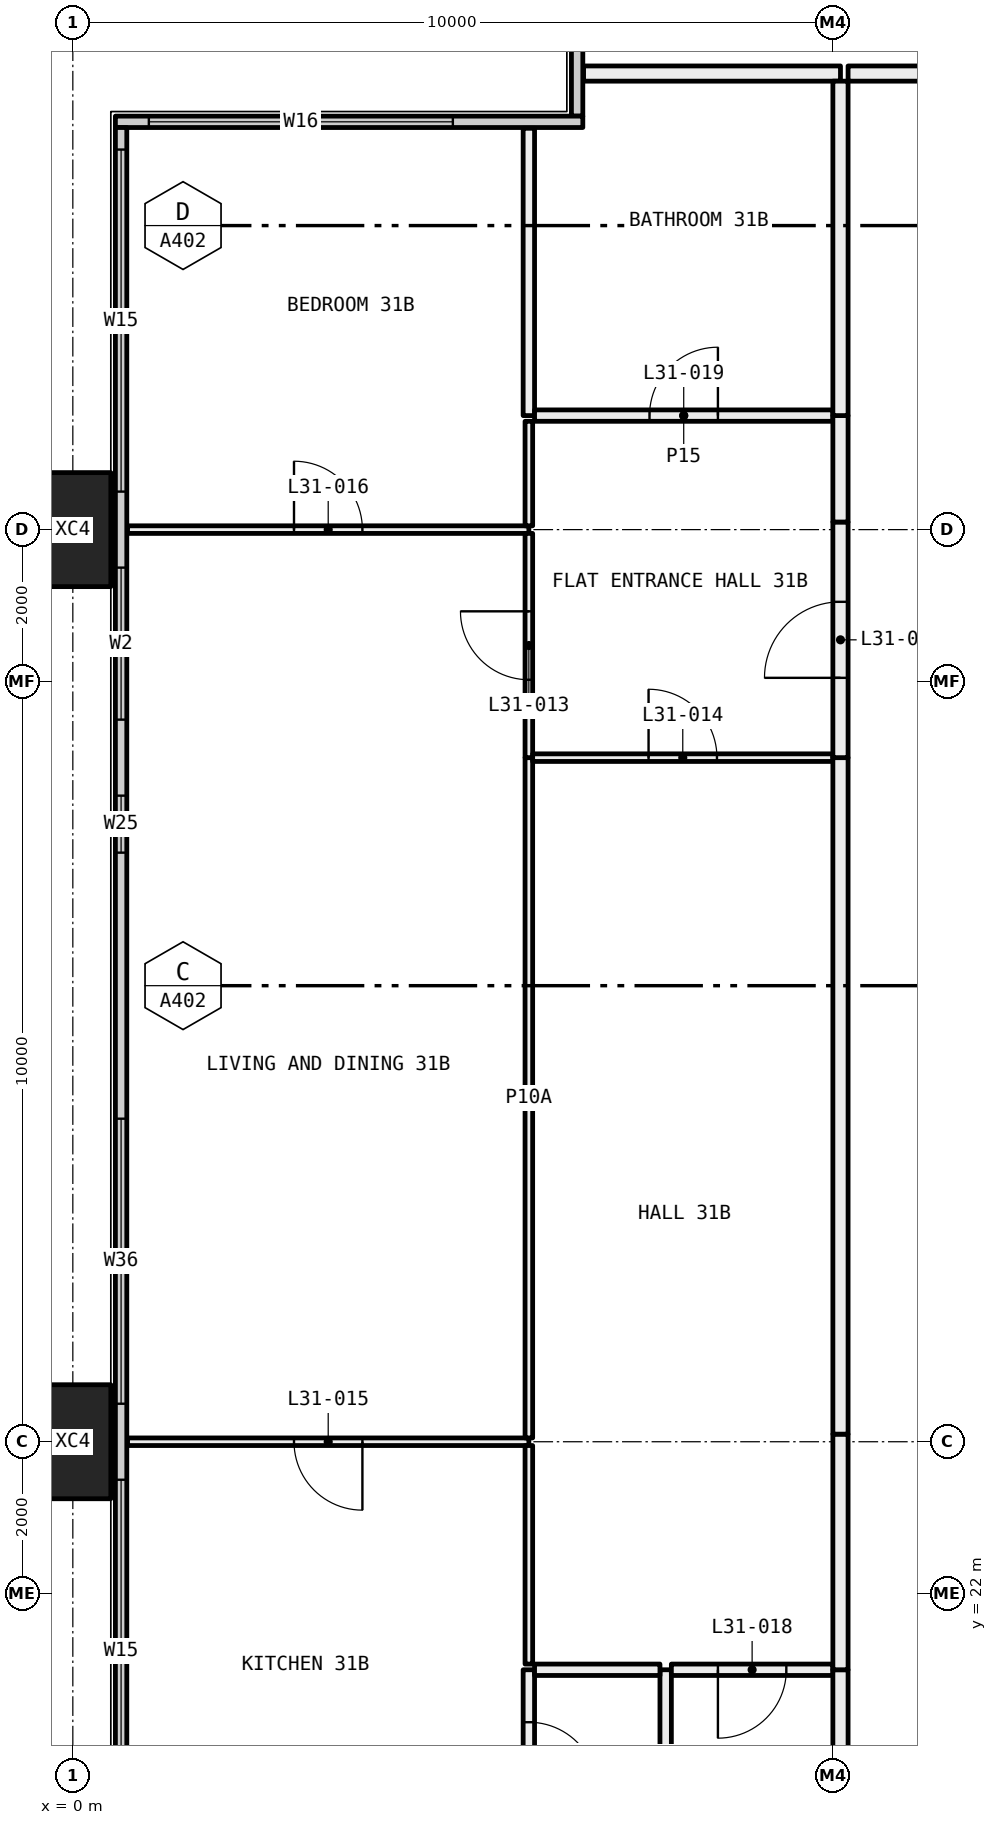
"""IFC4 building model, lengths in metres.
Left out: names, types, materials, properties, quantities, classifications, styles, units other than length and angle.
Written with IfcOpenShell. Run it as: python <this file> out.ifc"""

import sys

from ifc_helpers import new_model, si_unit, direction, frame, frame_2d, origin, origin_2d, place, context, subcontext, project, spatial, rectangle, hollow_rectangle, extrude, element, fill, save


model = new_model("IFC4")
c1 = context("Model", 3, precision=1e-05, world=origin(), true_north=direction((0.0, 1.0)))
c2 = subcontext(c1, "Body", "Model", "MODEL_VIEW")
j1 = project(units=[si_unit("LENGTHUNIT", "METRE"), si_unit("PLANEANGLEUNIT", "RADIAN")], contexts=[c1])
p1 = place(None, origin())
s1 = spatial("IfcSite", under=j1, at=p1, CompositionType="ELEMENT")
p2 = place(p1, origin())
s2 = spatial("IfcBuilding", under=s1, at=p2, CompositionType="ELEMENT")
p3 = place(p2, frame((0.0, 0.0, 120.75)))
s3 = spatial("IfcBuildingStorey", under=s2, at=p3, CompositionType="ELEMENT", Elevation=120.75)
for number, where, z_axis, x_axis in (
    (1, (0.0, 24.0, -0.4), (0.0, 0.0, 1.0), (0.0, 1.0, 0.0)),
    (2, (0.0, 36.0, -0.4), (0.0, 0.0, 1.0), (0.0, 1.0, 0.0)),
):
    element("IfcColumn", number, at=place(p3, frame(where, z_axis=z_axis, x_axis=x_axis)), inside=s3, PredefinedType="COLUMN", context=c2, shape_type="SweptSolid", body=[
        extrude(hollow_rectangle(XDim=1.5, YDim=1.0, WallThickness=0.06, at=origin_2d()), origin(), (0.0, 0.0, 1.0), 3.45),
    ])
p4 = place(p3, frame((6.635, 41.44, 0.0), z_axis=(0.0, 0.0, 1.0), x_axis=(0.0, 1.0, 0.0)))
e3 = element("IfcWall", 3, at=p4, inside=s3, PredefinedType="ELEMENTEDWALL", context=c2, shape_type="SweptSolid", body=[
    extrude(rectangle(XDim=5.85, YDim=0.15, at=frame_2d((2.925, 0.0))), origin(), (0.0, 0.0, 1.0), 3.05),
])
p5 = place(p4, frame((1.56, 0.0, 0.45)))
e4 = element("IfcOpeningElement", 4, at=p5, cuts=e3, PredefinedType="OPENING", context=c2, shape_type="SweptSolid", body=[
    extrude(rectangle(XDim=4.0, YDim=2.55, at=frame_2d((2.0, 1.275))), frame((0.0, 0.085, 0.0), z_axis=(0.0, -1.0, 0.0), x_axis=(1.0, 0.0, 0.0)), (0.0, 0.0, 1.0), 0.17),
])
p6 = place(p3, frame((0.56, 41.365, 0.0), z_axis=(0.0, 0.0, 1.0), x_axis=(1.0, 0.0, 0.0)))
e5 = element("IfcWall", 5, at=p6, inside=s3, PredefinedType="ELEMENTEDWALL", context=c2, shape_type="SweptSolid", body=[
    extrude(rectangle(XDim=6.15, YDim=0.15, at=frame_2d((3.075, 0.0))), origin(), (0.0, 0.0, 1.0), 3.05),
])
p7 = place(p6, frame((0.44, 0.0, 0.45)))
e6 = element("IfcOpeningElement", 6, at=p7, cuts=e5, PredefinedType="OPENING", context=c2, shape_type="SweptSolid", body=[
    extrude(rectangle(XDim=4.0, YDim=2.55, at=frame_2d((2.0, 1.275))), frame((0.0, 0.085, 0.0), z_axis=(0.0, -1.0, 0.0), x_axis=(1.0, 0.0, 0.0)), (0.0, 0.0, 1.0), 0.17),
])
p8 = place(p3, frame((0.635, 18.71, 0.0), z_axis=(0.0, 0.0, 1.0), x_axis=(0.0, 1.0, 0.0)))
e7 = element("IfcWall", 7, at=p8, inside=s3, PredefinedType="ELEMENTEDWALL", context=c2, shape_type="SweptSolid", body=[
    extrude(rectangle(XDim=22.58, YDim=0.15, at=frame_2d((11.29, 0.0))), origin(), (0.0, 0.0, 1.0), 3.05),
])
p9 = place(p8, frame((0.29, 0.0, 0.45)))
e8 = element("IfcOpeningElement", 8, at=p9, cuts=e7, PredefinedType="OPENING", context=c2, shape_type="SweptSolid", body=[
    extrude(rectangle(XDim=4.5, YDim=2.55, at=frame_2d((2.25, 1.275))), frame((0.0, 0.085, 0.0), z_axis=(0.0, -1.0, 0.0), x_axis=(1.0, 0.0, 0.0)), (0.0, 0.0, 1.0), 0.17),
])
p10 = place(p8, frame((5.79, 0.0, 0.45)))
e9 = element("IfcOpeningElement", 9, at=p10, cuts=e7, PredefinedType="OPENING", context=c2, shape_type="SweptSolid", body=[
    extrude(rectangle(XDim=3.75, YDim=2.55, at=frame_2d((1.875, 1.275))), frame((0.0, 0.085, 0.0), z_axis=(0.0, -1.0, 0.0), x_axis=(1.0, 0.0, 0.0)), (0.0, 0.0, 1.0), 0.17),
])
p11 = place(p8, frame((13.04, 0.0, 0.45)))
e10 = element("IfcOpeningElement", 10, at=p11, cuts=e7, PredefinedType="OPENING", context=c2, shape_type="SweptSolid", body=[
    extrude(rectangle(XDim=0.75, YDim=2.55, at=frame_2d((0.375, 1.275))), frame((0.0, 0.085, 0.0), z_axis=(0.0, -1.0, 0.0), x_axis=(1.0, 0.0, 0.0)), (0.0, 0.0, 1.0), 0.17),
])
p12 = place(p8, frame((14.79, 0.0, 0.45)))
e11 = element("IfcOpeningElement", 11, at=p12, cuts=e7, PredefinedType="OPENING", context=c2, shape_type="SweptSolid", body=[
    extrude(rectangle(XDim=2.0, YDim=2.55, at=frame_2d((1.0, 1.275))), frame((0.0, 0.085, 0.0), z_axis=(0.0, -1.0, 0.0), x_axis=(1.0, 0.0, 0.0)), (0.0, 0.0, 1.0), 0.17),
])
p13 = place(p8, frame((17.79, 0.0, 0.45)))
e12 = element("IfcOpeningElement", 12, at=p13, cuts=e7, PredefinedType="OPENING", context=c2, shape_type="SweptSolid", body=[
    extrude(rectangle(XDim=4.5, YDim=2.55, at=frame_2d((2.25, 1.275))), frame((0.0, 0.085, 0.0), z_axis=(0.0, -1.0, 0.0), x_axis=(1.0, 0.0, 0.0)), (0.0, 0.0, 1.0), 0.17),
])
p14 = place(p3, frame((6.0, 24.0, 0.0), z_axis=(0.0, 0.0, 1.0), x_axis=(-1.0, 0.0, 0.0)))
e13 = element("IfcWall", 13, at=p14, inside=s3, PredefinedType="PARTITIONING", context=c2, shape_type="SweptSolid", body=[
    extrude(rectangle(XDim=5.28, YDim=0.1, at=frame_2d((2.64, 0.0))), origin(), (0.0, 0.0, 1.0), 2.45),
])
p15 = place(p14, frame((2.19, 0.0, 0.0)))
e14 = element("IfcOpeningElement", 14, at=p15, cuts=e13, PredefinedType="OPENING", context=c2, shape_type="SweptSolid", body=[
    extrude(rectangle(XDim=0.9, YDim=2.1, at=frame_2d((0.45, 1.05))), frame((0.0, 0.06, 0.0), z_axis=(0.0, -1.0, 0.0), x_axis=(1.0, 0.0, 0.0)), (0.0, 0.0, 1.0), 0.12),
])
p16 = place(p3, frame((6.0, 18.72, 0.0), z_axis=(0.0, 0.0, 1.0), x_axis=(0.0, 1.0, 0.0)))
e15 = element("IfcWall", 15, at=p16, inside=s3, PredefinedType="PARTITIONING", context=c2, shape_type="SweptSolid", body=[
    extrude(rectangle(XDim=2.28, YDim=0.15, at=frame_2d((1.14, 0.0))), origin(), (0.0, 0.0, 1.0), 3.05),
])
p17 = place(p16, frame((0.69, 0.0, 0.0)))
e16 = element("IfcOpeningElement", 16, at=p17, cuts=e15, PredefinedType="OPENING", context=c2, shape_type="SweptSolid", body=[
    extrude(rectangle(XDim=0.9, YDim=2.1, at=frame_2d((0.45, 1.05))), frame((0.0, 0.085, 0.0), z_axis=(0.0, -1.0, 0.0), x_axis=(1.0, 0.0, 0.0)), (0.0, 0.0, 1.0), 0.17),
])
p18 = place(p3, frame((6.0, 21.075, 0.0), z_axis=(0.0, 0.0, 1.0), x_axis=(0.0, 1.0, 0.0)))
e17 = element("IfcWall", 17, at=p18, inside=s3, PredefinedType="PARTITIONING", context=c2, shape_type="SweptSolid", body=[
    extrude(rectangle(XDim=2.875, YDim=0.1, at=frame_2d((1.438, 0.0))), origin(), (0.0, 0.0, 1.0), 2.45),
])
p19 = place(p3, frame((6.0, 36.0, 0.0), z_axis=(0.0, 0.0, 1.0), x_axis=(-1.0, 0.0, 0.0)))
e18 = element("IfcWall", 18, at=p19, inside=s3, PredefinedType="PARTITIONING", context=c2, shape_type="SweptSolid", body=[
    extrude(rectangle(XDim=5.28, YDim=0.1, at=frame_2d((2.64, 0.0))), origin(), (0.0, 0.0, 1.0), 2.45),
])
p20 = place(p19, frame((2.19, 0.0, 0.0)))
e19 = element("IfcOpeningElement", 19, at=p20, cuts=e18, PredefinedType="OPENING", context=c2, shape_type="SweptSolid", body=[
    extrude(rectangle(XDim=0.9, YDim=2.1, at=frame_2d((0.45, 1.05))), frame((0.0, 0.06, 0.0), z_axis=(0.0, -1.0, 0.0), x_axis=(1.0, 0.0, 0.0)), (0.0, 0.0, 1.0), 0.12),
])
p21 = place(p3, frame((6.0, 24.05, 0.0), z_axis=(0.0, 0.0, 1.0), x_axis=(0.0, 1.0, 0.0)))
e20 = element("IfcWall", 20, at=p21, inside=s3, PredefinedType="PARTITIONING", context=c2, shape_type="SweptSolid", body=[
    extrude(rectangle(XDim=8.95, YDim=0.1, at=frame_2d((4.475, 0.0))), origin(), (0.0, 0.0, 1.0), 2.45),
])
p22 = place(p3, frame((6.0, 33.0, 0.0), z_axis=(0.0, 0.0, 1.0), x_axis=(0.0, 1.0, 0.0)))
e21 = element("IfcWall", 21, at=p22, inside=s3, PredefinedType="PARTITIONING", context=c2, shape_type="SweptSolid", body=[
    extrude(rectangle(XDim=2.95, YDim=0.1, at=frame_2d((1.475, 0.0))), origin(), (0.0, 0.0, 1.0), 2.45),
])
p23 = place(p22, frame((1.025, 0.0, 0.0)))
e22 = element("IfcOpeningElement", 22, at=p23, cuts=e21, PredefinedType="OPENING", context=c2, shape_type="SweptSolid", body=[
    extrude(rectangle(XDim=0.9, YDim=2.1, at=frame_2d((0.45, 1.05))), frame((0.0, 0.06, 0.0), z_axis=(0.0, -1.0, 0.0), x_axis=(1.0, 0.0, 0.0)), (0.0, 0.0, 1.0), 0.12),
])
p24 = place(p3, frame((6.0, 36.05, 0.0), z_axis=(0.0, 0.0, 1.0), x_axis=(0.0, 1.0, 0.0)))
e23 = element("IfcWall", 23, at=p24, inside=s3, PredefinedType="PARTITIONING", context=c2, shape_type="SweptSolid", body=[
    extrude(rectangle(XDim=1.375, YDim=0.1, at=frame_2d((0.688, 0.0))), origin(), (0.0, 0.0, 1.0), 2.45),
])
p25 = place(p3, frame((6.0, 37.5, 0.0), z_axis=(0.0, 0.0, 1.0), x_axis=(0.0, 1.0, 0.0)))
e24 = element("IfcWall", 24, at=p25, inside=s3, PredefinedType="PARTITIONING", context=c2, shape_type="SweptSolid", body=[
    extrude(rectangle(XDim=3.78, YDim=0.15, at=frame_2d((1.89, 0.0))), origin(), (0.0, 0.0, 1.0), 3.05),
])
p26 = place(p3, frame((7.8, 18.1, 0.0), z_axis=(0.0, 0.0, 1.0), x_axis=(0.0, 1.0, 0.0)))
e25 = element("IfcWall", 25, at=p26, inside=s3, PredefinedType="PARTITIONING", context=c2, shape_type="SweptSolid", body=[
    extrude(rectangle(XDim=2.9, YDim=0.15, at=frame_2d((1.45, 0.0))), origin(), (0.0, 0.0, 1.0), 3.05),
])
p27 = place(p3, frame((7.725, 21.0, 0.0), z_axis=(0.0, 0.0, 1.0), x_axis=(-1.0, 0.0, 0.0)))
e26 = element("IfcWall", 26, at=p27, inside=s3, PredefinedType="PARTITIONING", context=c2, shape_type="SweptSolid", body=[
    extrude(rectangle(XDim=1.65, YDim=0.15, at=frame_2d((0.825, 0.0))), origin(), (0.0, 0.0, 1.0), 3.05),
])
p28 = place(p3, frame((10.0, 21.0, 0.0), z_axis=(0.0, 0.0, 1.0), x_axis=(-1.0, 0.0, 0.0)))
e27 = element("IfcWall", 27, at=p28, inside=s3, PredefinedType="PARTITIONING", context=c2, shape_type="SweptSolid", body=[
    extrude(rectangle(XDim=2.125, YDim=0.15, at=frame_2d((1.062, 0.0))), origin(), (0.0, 0.0, 1.0), 3.05),
])
p29 = place(p28, frame((0.613, 0.0, 0.0)))
e28 = element("IfcOpeningElement", 28, at=p29, cuts=e27, PredefinedType="OPENING", context=c2, shape_type="SweptSolid", body=[
    extrude(rectangle(XDim=0.9, YDim=2.1, at=frame_2d((0.45, 1.05))), frame((0.0, 0.085, 0.0), z_axis=(0.0, -1.0, 0.0), x_axis=(1.0, 0.0, 0.0)), (0.0, 0.0, 1.0), 0.17),
])
p30 = place(p3, frame((10.1, 18.1, 0.0), z_axis=(0.0, 0.0, 1.0), x_axis=(0.0, 1.0, 0.0)))
e29 = element("IfcWall", 29, at=p30, inside=s3, PredefinedType="PARTITIONING", context=c2, shape_type="SweptSolid", body=[
    extrude(rectangle(XDim=2.9, YDim=0.2, at=frame_2d((1.45, 0.0))), origin(), (0.0, 0.0, 1.0), 3.05),
])
p31 = place(p3, frame((10.0, 33.0, 0.0), z_axis=(0.0, 0.0, 1.0), x_axis=(-1.0, 0.0, 0.0)))
e30 = element("IfcWall", 30, at=p31, inside=s3, PredefinedType="PARTITIONING", context=c2, shape_type="SweptSolid", body=[
    extrude(rectangle(XDim=3.95, YDim=0.1, at=frame_2d((1.975, 0.0))), origin(), (0.0, 0.0, 1.0), 3.05),
])
p32 = place(p31, frame((1.525, 0.0, 0.0)))
e31 = element("IfcOpeningElement", 31, at=p32, cuts=e30, PredefinedType="OPENING", context=c2, shape_type="SweptSolid", body=[
    extrude(rectangle(XDim=0.9, YDim=2.1, at=frame_2d((0.45, 1.05))), frame((0.0, 0.06, 0.0), z_axis=(0.0, -1.0, 0.0), x_axis=(1.0, 0.0, 0.0)), (0.0, 0.0, 1.0), 0.12),
])
p33 = place(p3, frame((10.1, 21.0, 0.0), z_axis=(0.0, 0.0, 1.0), x_axis=(0.0, 1.0, 0.0)))
e32 = element("IfcWall", 32, at=p33, inside=s3, PredefinedType="PARTITIONING", context=c2, shape_type="SweptSolid", body=[
    extrude(rectangle(XDim=3.1, YDim=0.2, at=frame_2d((1.55, 0.0))), origin(), (0.0, 0.0, 1.0), 2.45),
])
p34 = place(p3, frame((10.1, 24.1, 0.0), z_axis=(0.0, 0.0, 1.0), x_axis=(0.0, 1.0, 0.0)))
e33 = element("IfcWall", 33, at=p34, inside=s3, PredefinedType="PARTITIONING", context=c2, shape_type="SweptSolid", body=[
    extrude(rectangle(XDim=8.9, YDim=0.2, at=frame_2d((4.45, 0.0))), origin(), (0.0, 0.0, 1.0), 3.05),
])
p35 = place(p3, frame((10.0, 37.5, 0.0), z_axis=(0.0, 0.0, 1.0), x_axis=(-1.0, 0.0, 0.0)))
e34 = element("IfcWall", 34, at=p35, inside=s3, PredefinedType="PARTITIONING", context=c2, shape_type="SweptSolid", body=[
    extrude(rectangle(XDim=3.925, YDim=0.15, at=frame_2d((1.962, 0.0))), origin(), (0.0, 0.0, 1.0), 3.05),
])
p36 = place(p35, frame((1.512, 0.0, 0.0)))
e35 = element("IfcOpeningElement", 35, at=p36, cuts=e34, PredefinedType="OPENING", context=c2, shape_type="SweptSolid", body=[
    extrude(rectangle(XDim=0.9, YDim=2.1, at=frame_2d((0.45, 1.05))), frame((0.0, 0.085, 0.0), z_axis=(0.0, -1.0, 0.0), x_axis=(1.0, 0.0, 0.0)), (0.0, 0.0, 1.0), 0.17),
])
p37 = place(p3, frame((10.1, 33.0, 0.0), z_axis=(0.0, 0.0, 1.0), x_axis=(0.0, 1.0, 0.0)))
e36 = element("IfcWall", 36, at=p37, inside=s3, PredefinedType="PARTITIONING", context=c2, shape_type="SweptSolid", body=[
    extrude(rectangle(XDim=3.1, YDim=0.2, at=frame_2d((1.55, 0.0))), origin(), (0.0, 0.0, 1.0), 2.45),
])
p38 = place(p37, frame((1.05, 0.0, 0.0)))
e37 = element("IfcOpeningElement", 37, at=p38, cuts=e36, PredefinedType="OPENING", context=c2, shape_type="SweptSolid", body=[
    extrude(rectangle(XDim=1.0, YDim=2.1, at=frame_2d((0.5, 1.05))), frame((0.0, 0.11, 0.0), z_axis=(0.0, -1.0, 0.0), x_axis=(1.0, 0.0, 0.0)), (0.0, 0.0, 1.0), 0.22),
])
p39 = place(p3, frame((10.1, 36.1, 0.0), z_axis=(0.0, 0.0, 1.0), x_axis=(0.0, 1.0, 0.0)))
e38 = element("IfcWall", 38, at=p39, inside=s3, PredefinedType="PARTITIONING", context=c2, shape_type="SweptSolid", body=[
    extrude(rectangle(XDim=1.4, YDim=0.2, at=frame_2d((0.7, 0.0))), origin(), (0.0, 0.0, 1.0), 3.05),
])
p40 = place(p3, frame((10.1, 42.0, 0.0), z_axis=(0.0, 0.0, 1.0), x_axis=(-1.0, 0.0, 0.0)))
e39 = element("IfcWall", 39, at=p40, inside=s3, PredefinedType="PARTITIONING", context=c2, shape_type="SweptSolid", body=[
    extrude(rectangle(XDim=3.38, YDim=0.2, at=frame_2d((1.69, 0.0))), origin(), (0.0, 0.0, 1.0), 3.05),
])
p41 = place(p3, frame((10.1, 37.5, 0.0), z_axis=(0.0, 0.0, 1.0), x_axis=(0.0, 1.0, 0.0)))
e40 = element("IfcWall", 40, at=p41, inside=s3, PredefinedType="PARTITIONING", context=c2, shape_type="SweptSolid", body=[
    extrude(rectangle(XDim=4.4, YDim=0.2, at=frame_2d((2.2, 0.0))), origin(), (0.0, 0.0, 1.0), 3.05),
])
p42 = place(p3, frame((10.2, 42.0, 0.0), z_axis=(0.0, 0.0, 1.0), x_axis=(1.0, 0.0, 0.0)))
e41 = element("IfcWall", 41, at=p42, inside=s3, PredefinedType="PARTITIONING", context=c2, shape_type="SweptSolid", body=[
    extrude(rectangle(XDim=1.8, YDim=0.2, at=frame_2d((0.9, 0.0))), origin(), (0.0, 0.0, 1.0), 3.05),
])
p43 = place(p7, origin())
e42 = element("IfcWindow", 42, at=p43, inside=s3, PartitioningType="SINGLE_PANEL", PredefinedType="WINDOW", context=c2, shape_type="SweptSolid", body=[
    extrude(rectangle(XDim=4.0, YDim=2.55, at=frame_2d((2.0, 1.275))), frame((0.0, 0.03, 0.0), z_axis=(0.0, -1.0, 0.0), x_axis=(1.0, 0.0, 0.0)), (0.0, 0.0, 1.0), 0.06),
])
fill(e6, e42)
p44 = place(p9, origin())
e43 = element("IfcWindow", 43, at=p44, inside=s3, PartitioningType="SINGLE_PANEL", PredefinedType="WINDOW", context=c2, shape_type="SweptSolid", body=[
    extrude(rectangle(XDim=4.5, YDim=2.55, at=frame_2d((2.25, 1.275))), frame((0.0, 0.03, 0.0), z_axis=(0.0, -1.0, 0.0), x_axis=(1.0, 0.0, 0.0)), (0.0, 0.0, 1.0), 0.06),
])
fill(e8, e43)
p45 = place(p10, origin())
e44 = element("IfcWindow", 44, at=p45, inside=s3, PartitioningType="SINGLE_PANEL", PredefinedType="WINDOW", context=c2, shape_type="SweptSolid", body=[
    extrude(rectangle(XDim=3.75, YDim=2.55, at=frame_2d((1.875, 1.275))), frame((0.0, 0.03, 0.0), z_axis=(0.0, -1.0, 0.0), x_axis=(1.0, 0.0, 0.0)), (0.0, 0.0, 1.0), 0.06),
])
fill(e9, e44)
p46 = place(p11, origin())
e45 = element("IfcWindow", 45, at=p46, inside=s3, PartitioningType="SINGLE_PANEL", PredefinedType="WINDOW", context=c2, shape_type="SweptSolid", body=[
    extrude(rectangle(XDim=0.75, YDim=2.55, at=frame_2d((0.375, 1.275))), frame((0.0, 0.03, 0.0), z_axis=(0.0, -1.0, 0.0), x_axis=(1.0, 0.0, 0.0)), (0.0, 0.0, 1.0), 0.06),
])
fill(e10, e45)
p47 = place(p12, origin())
e46 = element("IfcWindow", 46, at=p47, inside=s3, PartitioningType="SINGLE_PANEL", PredefinedType="WINDOW", context=c2, shape_type="SweptSolid", body=[
    extrude(rectangle(XDim=2.0, YDim=2.55, at=frame_2d((1.0, 1.275))), frame((0.0, 0.03, 0.0), z_axis=(0.0, -1.0, 0.0), x_axis=(1.0, 0.0, 0.0)), (0.0, 0.0, 1.0), 0.06),
])
fill(e11, e46)
p48 = place(p13, origin())
e47 = element("IfcWindow", 47, at=p48, inside=s3, PartitioningType="SINGLE_PANEL", PredefinedType="WINDOW", context=c2, shape_type="SweptSolid", body=[
    extrude(rectangle(XDim=4.5, YDim=2.55, at=frame_2d((2.25, 1.275))), frame((0.0, 0.03, 0.0), z_axis=(0.0, -1.0, 0.0), x_axis=(1.0, 0.0, 0.0)), (0.0, 0.0, 1.0), 0.06),
])
fill(e12, e47)
p49 = place(p38, origin())
e48 = element("IfcDoor", 48, at=p49, inside=s3, OperationType="SINGLE_SWING_RIGHT", PredefinedType="DOOR", context=c2, shape_type="SweptSolid", body=[
    extrude(rectangle(XDim=1.0, YDim=2.1, at=frame_2d((0.5, 1.05))), frame((0.0, 0.025, 0.0), z_axis=(0.0, -1.0, 0.0), x_axis=(1.0, 0.0, 0.0)), (0.0, 0.0, 1.0), 0.05),
])
fill(e37, e48)
p50 = place(p23, origin())
e49 = element("IfcDoor", 49, at=p50, inside=s3, OperationType="SINGLE_SWING_LEFT", PredefinedType="DOOR", context=c2, shape_type="SweptSolid", body=[
    extrude(rectangle(XDim=0.9, YDim=2.1, at=frame_2d((0.45, 1.05))), frame((0.0, 0.025, 0.0), z_axis=(0.0, -1.0, 0.0), x_axis=(1.0, 0.0, 0.0)), (0.0, 0.0, 1.0), 0.05),
])
fill(e22, e49)
p51 = place(p32, frame((0.9, 0.0, 0.0), x_axis=(-1.0, 0.0, 0.0)))
e50 = element("IfcDoor", 50, at=p51, inside=s3, OperationType="SINGLE_SWING_RIGHT", PredefinedType="DOOR", context=c2, shape_type="SweptSolid", body=[
    extrude(rectangle(XDim=0.9, YDim=2.1, at=frame_2d((0.45, 1.05))), frame((0.0, 0.025, 0.0), z_axis=(0.0, -1.0, 0.0), x_axis=(1.0, 0.0, 0.0)), (0.0, 0.0, 1.0), 0.05),
])
fill(e31, e50)
p52 = place(p15, origin())
e51 = element("IfcDoor", 51, at=p52, inside=s3, OperationType="SINGLE_SWING_RIGHT", PredefinedType="DOOR", context=c2, shape_type="SweptSolid", body=[
    extrude(rectangle(XDim=0.9, YDim=2.1, at=frame_2d((0.45, 1.05))), frame((0.0, 0.025, 0.0), z_axis=(0.0, -1.0, 0.0), x_axis=(1.0, 0.0, 0.0)), (0.0, 0.0, 1.0), 0.05),
])
fill(e14, e51)
p53 = place(p20, frame((0.9, 0.0, 0.0), x_axis=(-1.0, 0.0, 0.0)))
e52 = element("IfcDoor", 52, at=p53, inside=s3, OperationType="SINGLE_SWING_RIGHT", PredefinedType="DOOR", context=c2, shape_type="SweptSolid", body=[
    extrude(rectangle(XDim=0.9, YDim=2.1, at=frame_2d((0.45, 1.05))), frame((0.0, 0.025, 0.0), z_axis=(0.0, -1.0, 0.0), x_axis=(1.0, 0.0, 0.0)), (0.0, 0.0, 1.0), 0.05),
])
fill(e19, e52)
p54 = place(p17, frame((0.9, 0.0, 0.0), x_axis=(-1.0, 0.0, 0.0)))
e53 = element("IfcDoor", 53, at=p54, inside=s3, OperationType="SINGLE_SWING_LEFT", PredefinedType="DOOR", context=c2, shape_type="SweptSolid", body=[
    extrude(rectangle(XDim=0.9, YDim=2.1, at=frame_2d((0.45, 1.05))), frame((0.0, 0.025, 0.0), z_axis=(0.0, -1.0, 0.0), x_axis=(1.0, 0.0, 0.0)), (0.0, 0.0, 1.0), 0.05),
])
fill(e16, e53)
p55 = place(p29, origin())
e54 = element("IfcDoor", 54, at=p55, inside=s3, OperationType="SINGLE_SWING_LEFT", PredefinedType="DOOR", context=c2, shape_type="SweptSolid", body=[
    extrude(rectangle(XDim=0.9, YDim=2.1, at=frame_2d((0.45, 1.05))), frame((0.0, 0.025, 0.0), z_axis=(0.0, -1.0, 0.0), x_axis=(1.0, 0.0, 0.0)), (0.0, 0.0, 1.0), 0.05),
])
fill(e28, e54)
p56 = place(p36, frame((0.9, 0.0, 0.0), x_axis=(-1.0, 0.0, 0.0)))
e55 = element("IfcDoor", 55, at=p56, inside=s3, OperationType="SINGLE_SWING_LEFT", PredefinedType="DOOR", context=c2, shape_type="SweptSolid", body=[
    extrude(rectangle(XDim=0.9, YDim=2.1, at=frame_2d((0.45, 1.05))), frame((0.0, 0.025, 0.0), z_axis=(0.0, -1.0, 0.0), x_axis=(1.0, 0.0, 0.0)), (0.0, 0.0, 1.0), 0.05),
])
fill(e35, e55)
save(model, sys.argv[1])
